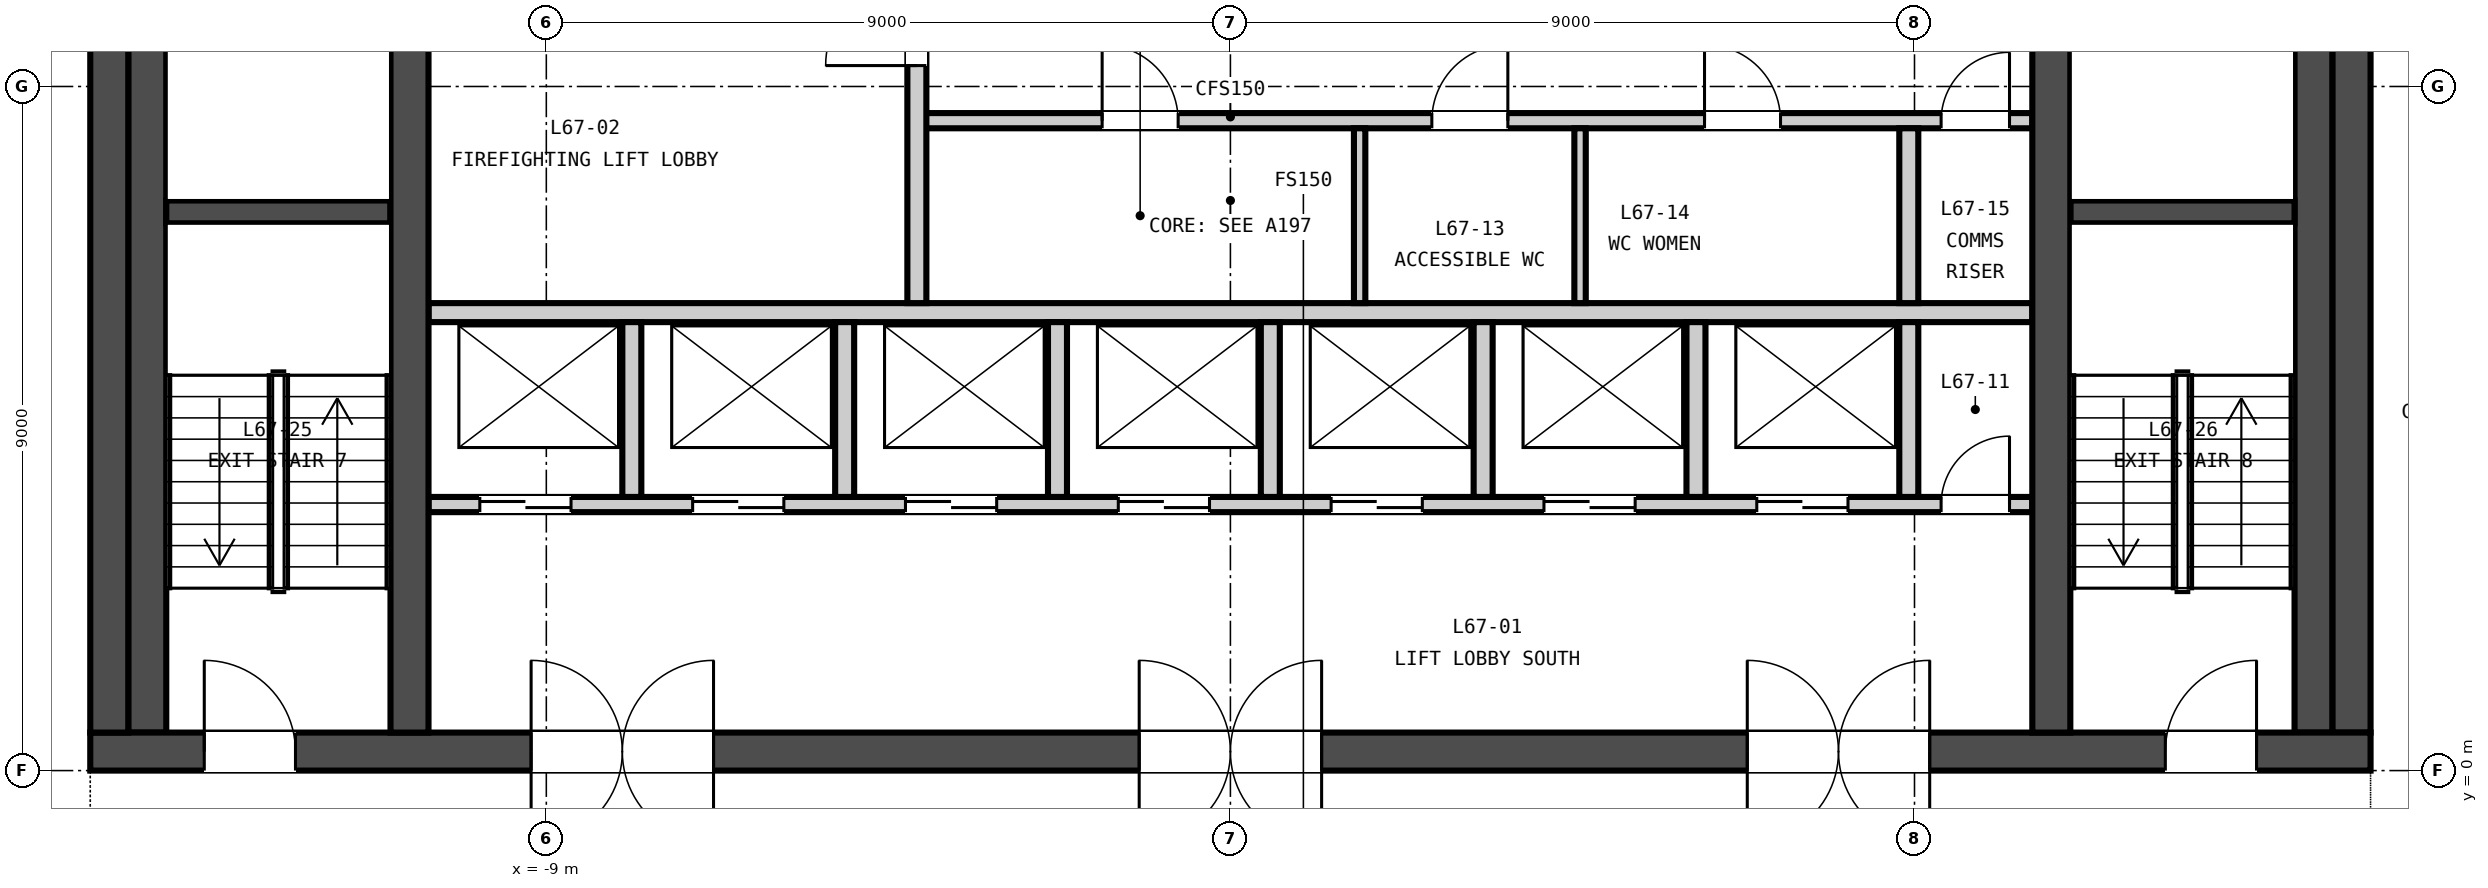
"""IFC4 building model, lengths in metres.
Left out: names, types, materials, properties, quantities, classifications, styles, units other than length and angle.
Written with IfcOpenShell. Run it as: python <this file> out.ifc"""

import sys

from ifc_helpers import new_model, si_unit, direction, frame, frame_2d, origin, place, context, subcontext, project, spatial, rectangle, extrude, element, fill, save


model = new_model("IFC4")
c1 = context("Model", 3, precision=1e-05, world=origin(), true_north=direction((0.0, 1.0)))
c2 = subcontext(c1, "Body", "Model", "MODEL_VIEW")
j1 = project(units=[si_unit("LENGTHUNIT", "METRE"), si_unit("PLANEANGLEUNIT", "RADIAN")], contexts=[c1])
p1 = place(None, origin())
s1 = spatial("IfcSite", under=j1, at=p1, CompositionType="ELEMENT")
p2 = place(p1, origin())
s2 = spatial("IfcBuilding", under=s1, at=p2, CompositionType="ELEMENT")
p3 = place(p2, frame((0.0, 0.0, 264.6)))
s3 = spatial("IfcBuildingStorey", under=s2, at=p3, CompositionType="ELEMENT", Elevation=264.6)
p4 = place(p3, frame((-15.0, 0.25, -0.15), z_axis=(0.0, 0.0, 1.0), x_axis=(1.0, 0.0, 0.0)))
e1 = element("IfcWall", 1, at=p4, inside=s3, PredefinedType="SOLIDWALL", context=c2, shape_type="SweptSolid", body=[
    extrude(rectangle(XDim=30.0, YDim=0.5, at=frame_2d((15.0, 0.0))), origin(), (0.0, 0.0, 1.0), 3.65),
])
p5 = place(p4, frame((5.8, 0.0, 0.15)))
e2 = element("IfcOpeningElement", 2, at=p5, cuts=e1, PredefinedType="OPENING", context=c2, shape_type="SweptSolid", body=[
    extrude(rectangle(XDim=2.4, YDim=2.4, at=frame_2d((1.2, 1.2))), frame((0.0, 0.26, 0.0), z_axis=(0.0, -1.0, 0.0), x_axis=(1.0, 0.0, 0.0)), (0.0, 0.0, 1.0), 0.52),
])
p6 = place(p4, frame((13.8, 0.0, 0.15)))
e3 = element("IfcOpeningElement", 3, at=p6, cuts=e1, PredefinedType="OPENING", context=c2, shape_type="SweptSolid", body=[
    extrude(rectangle(XDim=2.4, YDim=2.4, at=frame_2d((1.2, 1.2))), frame((0.0, 0.26, 0.0), z_axis=(0.0, -1.0, 0.0), x_axis=(1.0, 0.0, 0.0)), (0.0, 0.0, 1.0), 0.52),
])
p7 = place(p4, frame((21.8, 0.0, 0.15)))
e4 = element("IfcOpeningElement", 4, at=p7, cuts=e1, PredefinedType="OPENING", context=c2, shape_type="SweptSolid", body=[
    extrude(rectangle(XDim=2.4, YDim=2.4, at=frame_2d((1.2, 1.2))), frame((0.0, 0.26, 0.0), z_axis=(0.0, -1.0, 0.0), x_axis=(1.0, 0.0, 0.0)), (0.0, 0.0, 1.0), 0.52),
])
p8 = place(p4, frame((1.5, 0.0, 0.15)))
e5 = element("IfcOpeningElement", 5, at=p8, cuts=e1, PredefinedType="OPENING", context=c2, shape_type="SweptSolid", body=[
    extrude(rectangle(XDim=1.2, YDim=2.1, at=frame_2d((0.6, 1.05))), frame((0.0, 0.26, 0.0), z_axis=(0.0, -1.0, 0.0), x_axis=(1.0, 0.0, 0.0)), (0.0, 0.0, 1.0), 0.52),
])
p9 = place(p4, frame((27.3, 0.0, 0.15)))
e6 = element("IfcOpeningElement", 6, at=p9, cuts=e1, PredefinedType="OPENING", context=c2, shape_type="SweptSolid", body=[
    extrude(rectangle(XDim=1.2, YDim=2.1, at=frame_2d((0.6, 1.05))), frame((0.0, 0.26, 0.0), z_axis=(0.0, -1.0, 0.0), x_axis=(1.0, 0.0, 0.0)), (0.0, 0.0, 1.0), 0.52),
])
for number, where, z_axis, x_axis in (
    (7, (-14.75, 0.5, -0.15), (0.0, 0.0, 1.0), (0.0, 1.0, 0.0)),
    (8, (14.75, 0.5, -0.15), (0.0, 0.0, 1.0), (0.0, 1.0, 0.0)),
    (9, (-10.8, 0.5, -0.15), (0.0, 0.0, 1.0), (0.0, 1.0, 0.0)),
    (10, (10.8, 0.5, -0.15), (0.0, 0.0, 1.0), (0.0, 1.0, 0.0)),
):
    element("IfcWall", number, at=place(p3, frame(where, z_axis=z_axis, x_axis=x_axis)), inside=s3, PredefinedType="SOLIDWALL", context=c2, shape_type="SweptSolid", body=[
        extrude(rectangle(XDim=14.0, YDim=0.5, at=frame_2d((7.0, 0.0))), origin(), (0.0, 0.0, 1.0), 3.65),
    ])
p10 = place(p3, frame((-10.55, 3.5, 0.0), z_axis=(0.0, 0.0, 1.0), x_axis=(1.0, 0.0, 0.0)))
e11 = element("IfcWall", 11, at=p10, inside=s3, PredefinedType="PARTITIONING", context=c2, shape_type="SweptSolid", body=[
    extrude(rectangle(XDim=21.1, YDim=0.2, at=frame_2d((10.55, 0.0))), origin(), (0.0, 0.0, 1.0), 3.5),
])
p11 = place(p10, frame((0.675, 0.0, 0.0)))
e12 = element("IfcOpeningElement", 12, at=p11, cuts=e11, PredefinedType="OPENING", context=c2, shape_type="SweptSolid", body=[
    extrude(rectangle(XDim=1.2, YDim=2.1, at=frame_2d((0.6, 1.05))), frame((0.0, 0.11, 0.0), z_axis=(0.0, -1.0, 0.0), x_axis=(1.0, 0.0, 0.0)), (0.0, 0.0, 1.0), 0.22),
])
p12 = place(p10, frame((3.475, 0.0, 0.0)))
e13 = element("IfcOpeningElement", 13, at=p12, cuts=e11, PredefinedType="OPENING", context=c2, shape_type="SweptSolid", body=[
    extrude(rectangle(XDim=1.2, YDim=2.1, at=frame_2d((0.6, 1.05))), frame((0.0, 0.11, 0.0), z_axis=(0.0, -1.0, 0.0), x_axis=(1.0, 0.0, 0.0)), (0.0, 0.0, 1.0), 0.22),
])
p13 = place(p10, frame((6.275, 0.0, 0.0)))
e14 = element("IfcOpeningElement", 14, at=p13, cuts=e11, PredefinedType="OPENING", context=c2, shape_type="SweptSolid", body=[
    extrude(rectangle(XDim=1.2, YDim=2.1, at=frame_2d((0.6, 1.05))), frame((0.0, 0.11, 0.0), z_axis=(0.0, -1.0, 0.0), x_axis=(1.0, 0.0, 0.0)), (0.0, 0.0, 1.0), 0.22),
])
p14 = place(p10, frame((9.075, 0.0, 0.0)))
e15 = element("IfcOpeningElement", 15, at=p14, cuts=e11, PredefinedType="OPENING", context=c2, shape_type="SweptSolid", body=[
    extrude(rectangle(XDim=1.2, YDim=2.1, at=frame_2d((0.6, 1.05))), frame((0.0, 0.11, 0.0), z_axis=(0.0, -1.0, 0.0), x_axis=(1.0, 0.0, 0.0)), (0.0, 0.0, 1.0), 0.22),
])
p15 = place(p10, frame((11.875, 0.0, 0.0)))
e16 = element("IfcOpeningElement", 16, at=p15, cuts=e11, PredefinedType="OPENING", context=c2, shape_type="SweptSolid", body=[
    extrude(rectangle(XDim=1.2, YDim=2.1, at=frame_2d((0.6, 1.05))), frame((0.0, 0.11, 0.0), z_axis=(0.0, -1.0, 0.0), x_axis=(1.0, 0.0, 0.0)), (0.0, 0.0, 1.0), 0.22),
])
p16 = place(p10, frame((14.675, 0.0, 0.0)))
e17 = element("IfcOpeningElement", 17, at=p16, cuts=e11, PredefinedType="OPENING", context=c2, shape_type="SweptSolid", body=[
    extrude(rectangle(XDim=1.2, YDim=2.1, at=frame_2d((0.6, 1.05))), frame((0.0, 0.11, 0.0), z_axis=(0.0, -1.0, 0.0), x_axis=(1.0, 0.0, 0.0)), (0.0, 0.0, 1.0), 0.22),
])
p17 = place(p10, frame((17.475, 0.0, 0.0)))
e18 = element("IfcOpeningElement", 18, at=p17, cuts=e11, PredefinedType="OPENING", context=c2, shape_type="SweptSolid", body=[
    extrude(rectangle(XDim=1.2, YDim=2.1, at=frame_2d((0.6, 1.05))), frame((0.0, 0.11, 0.0), z_axis=(0.0, -1.0, 0.0), x_axis=(1.0, 0.0, 0.0)), (0.0, 0.0, 1.0), 0.22),
])
p18 = place(p10, frame((19.9, 0.0, 0.0)))
e19 = element("IfcOpeningElement", 19, at=p18, cuts=e11, PredefinedType="OPENING", context=c2, shape_type="SweptSolid", body=[
    extrude(rectangle(XDim=0.9, YDim=2.1, at=frame_2d((0.45, 1.05))), frame((0.0, 0.11, 0.0), z_axis=(0.0, -1.0, 0.0), x_axis=(1.0, 0.0, 0.0)), (0.0, 0.0, 1.0), 0.22),
])
p19 = place(p3, frame((-10.55, 6.025, 0.0), z_axis=(0.0, 0.0, 1.0), x_axis=(1.0, 0.0, 0.0)))
e20 = element("IfcWall", 20, at=p19, inside=s3, PredefinedType="PARTITIONING", context=c2, shape_type="SweptSolid", body=[
    extrude(rectangle(XDim=21.1, YDim=0.25, at=frame_2d((10.55, 0.0))), origin(), (0.0, 0.0, 1.0), 3.5),
])
p20 = place(p3, frame((-4.125, 8.55, 0.0), z_axis=(0.0, 0.0, 1.0), x_axis=(1.0, 0.0, 0.0)))
e21 = element("IfcWall", 21, at=p20, inside=s3, PredefinedType="PARTITIONING", context=c2, shape_type="SweptSolid", body=[
    extrude(rectangle(XDim=14.675, YDim=0.2, at=frame_2d((7.337, 0.0))), origin(), (0.0, 0.0, 1.0), 3.5),
])
p21 = place(p20, frame((2.438, 0.0, 0.0)))
e22 = element("IfcOpeningElement", 22, at=p21, cuts=e21, PredefinedType="OPENING", context=c2, shape_type="SweptSolid", body=[
    extrude(rectangle(XDim=1.0, YDim=2.1, at=frame_2d((0.5, 1.05))), frame((0.0, 0.11, 0.0), z_axis=(0.0, -1.0, 0.0), x_axis=(1.0, 0.0, 0.0)), (0.0, 0.0, 1.0), 0.22),
])
p22 = place(p20, frame((6.775, 0.0, 0.0)))
e23 = element("IfcOpeningElement", 23, at=p22, cuts=e21, PredefinedType="OPENING", context=c2, shape_type="SweptSolid", body=[
    extrude(rectangle(XDim=1.0, YDim=2.1, at=frame_2d((0.5, 1.05))), frame((0.0, 0.11, 0.0), z_axis=(0.0, -1.0, 0.0), x_axis=(1.0, 0.0, 0.0)), (0.0, 0.0, 1.0), 0.22),
])
p23 = place(p20, frame((10.363, 0.0, 0.0)))
e24 = element("IfcOpeningElement", 24, at=p23, cuts=e21, PredefinedType="OPENING", context=c2, shape_type="SweptSolid", body=[
    extrude(rectangle(XDim=1.0, YDim=2.1, at=frame_2d((0.5, 1.05))), frame((0.0, 0.11, 0.0), z_axis=(0.0, -1.0, 0.0), x_axis=(1.0, 0.0, 0.0)), (0.0, 0.0, 1.0), 0.22),
])
p24 = place(p20, frame((13.475, 0.0, 0.0)))
e25 = element("IfcOpeningElement", 25, at=p24, cuts=e21, PredefinedType="OPENING", context=c2, shape_type="SweptSolid", body=[
    extrude(rectangle(XDim=0.9, YDim=2.1, at=frame_2d((0.45, 1.05))), frame((0.0, 0.11, 0.0), z_axis=(0.0, -1.0, 0.0), x_axis=(1.0, 0.0, 0.0)), (0.0, 0.0, 1.0), 0.22),
])
p25 = place(p3, frame((-4.125, 6.15, 0.0), z_axis=(0.0, 0.0, 1.0), x_axis=(0.0, 1.0, 0.0)))
e26 = element("IfcWall", 26, at=p25, inside=s3, PredefinedType="PARTITIONING", context=c2, shape_type="SweptSolid", body=[
    extrude(rectangle(XDim=4.95, YDim=0.25, at=frame_2d((2.475, 0.0))), origin(), (0.0, 0.0, 1.0), 3.5),
])
p26 = place(p25, frame((3.125, 0.0, 0.0)))
e27 = element("IfcOpeningElement", 27, at=p26, cuts=e26, PredefinedType="OPENING", context=c2, shape_type="SweptSolid", body=[
    extrude(rectangle(XDim=1.2, YDim=2.1, at=frame_2d((0.6, 1.05))), frame((0.0, 0.135, 0.0), z_axis=(0.0, -1.0, 0.0), x_axis=(1.0, 0.0, 0.0)), (0.0, 0.0, 1.0), 0.27),
])
for number, where, z_axis, x_axis in (
    (28, (-7.875, 3.6, 0.0), (0.0, 0.0, 1.0), (0.0, 1.0, 0.0)),
    (29, (-5.075, 3.6, 0.0), (0.0, 0.0, 1.0), (0.0, 1.0, 0.0)),
    (30, (-2.275, 3.6, 0.0), (0.0, 0.0, 1.0), (0.0, 1.0, 0.0)),
    (31, (0.525, 3.6, 0.0), (0.0, 0.0, 1.0), (0.0, 1.0, 0.0)),
    (32, (3.325, 3.6, 0.0), (0.0, 0.0, 1.0), (0.0, 1.0, 0.0)),
    (33, (6.125, 3.6, 0.0), (0.0, 0.0, 1.0), (0.0, 1.0, 0.0)),
    (34, (8.925, 3.6, 0.0), (0.0, 0.0, 1.0), (0.0, 1.0, 0.0)),
):
    element("IfcWall", number, at=place(p3, frame(where, z_axis=z_axis, x_axis=x_axis)), inside=s3, PredefinedType="PARTITIONING", context=c2, shape_type="SweptSolid", body=[
        extrude(rectangle(XDim=2.3, YDim=0.25, at=frame_2d((1.15, 0.0))), origin(), (0.0, 0.0, 1.0), 3.5),
    ])
for number, where, z_axis, x_axis in (
    (35, (1.7, 6.15, 0.0), (0.0, 0.0, 1.0), (0.0, 1.0, 0.0)),
    (36, (4.6, 6.15, 0.0), (0.0, 0.0, 1.0), (0.0, 1.0, 0.0)),
):
    element("IfcWall", number, at=place(p3, frame(where, z_axis=z_axis, x_axis=x_axis)), inside=s3, PredefinedType="PARTITIONING", context=c2, shape_type="SweptSolid", body=[
        extrude(rectangle(XDim=2.3, YDim=0.15, at=frame_2d((1.15, 0.0))), origin(), (0.0, 0.0, 1.0), 3.5),
    ])
p27 = place(p3, frame((8.925, 6.15, 0.0), z_axis=(0.0, 0.0, 1.0), x_axis=(0.0, 1.0, 0.0)))
e37 = element("IfcWall", 37, at=p27, inside=s3, PredefinedType="PARTITIONING", context=c2, shape_type="SweptSolid", body=[
    extrude(rectangle(XDim=2.3, YDim=0.25, at=frame_2d((1.15, 0.0))), origin(), (0.0, 0.0, 1.0), 3.5),
])
p28 = place(p3, frame((-14.0, 7.35, 0.0), z_axis=(0.0, 0.0, 1.0), x_axis=(1.0, 0.0, 0.0)))
e38 = element("IfcWall", 38, at=p28, inside=s3, PredefinedType="SOLIDWALL", context=c2, shape_type="SweptSolid", body=[
    extrude(rectangle(XDim=2.95, YDim=0.3, at=frame_2d((1.475, 0.0))), origin(), (0.0, 0.0, 1.0), 3.5),
])
p29 = place(p3, frame((-14.25, 0.5, 0.0), z_axis=(0.0, 0.0, 1.0), x_axis=(0.0, 1.0, 0.0)))
e39 = element("IfcWall", 39, at=p29, inside=s3, PredefinedType="SOLIDWALL", context=c2, shape_type="SweptSolid", body=[
    extrude(rectangle(XDim=14.0, YDim=0.5, at=frame_2d((7.0, 0.0))), origin(), (0.0, 0.0, 1.0), 3.5),
])
p30 = place(p3, frame((11.05, 7.35, 0.0), z_axis=(0.0, 0.0, 1.0), x_axis=(1.0, 0.0, 0.0)))
e40 = element("IfcWall", 40, at=p30, inside=s3, PredefinedType="SOLIDWALL", context=c2, shape_type="SweptSolid", body=[
    extrude(rectangle(XDim=2.95, YDim=0.3, at=frame_2d((1.475, 0.0))), origin(), (0.0, 0.0, 1.0), 3.5),
])
p31 = place(p3, frame((14.25, 0.5, 0.0), z_axis=(0.0, 0.0, 1.0), x_axis=(0.0, 1.0, 0.0)))
e41 = element("IfcWall", 41, at=p31, inside=s3, PredefinedType="SOLIDWALL", context=c2, shape_type="SweptSolid", body=[
    extrude(rectangle(XDim=14.0, YDim=0.5, at=frame_2d((7.0, 0.0))), origin(), (0.0, 0.0, 1.0), 3.5),
])
p32 = place(p26, origin())
e42 = element("IfcDoor", 42, at=p32, inside=s3, OperationType="SINGLE_SWING_LEFT", PredefinedType="DOOR", context=c2, shape_type="SweptSolid", body=[
    extrude(rectangle(XDim=1.2, YDim=2.1, at=frame_2d((0.6, 1.05))), frame((0.0, 0.025, 0.0), z_axis=(0.0, -1.0, 0.0), x_axis=(1.0, 0.0, 0.0)), (0.0, 0.0, 1.0), 0.05),
])
fill(e27, e42)
p33 = place(p11, origin())
e43 = element("IfcDoor", 43, at=p33, inside=s3, OperationType="DOUBLE_DOOR_SLIDING", PredefinedType="DOOR", context=c2, shape_type="SweptSolid", body=[
    extrude(rectangle(XDim=1.2, YDim=2.1, at=frame_2d((0.6, 1.05))), frame((0.0, 0.025, 0.0), z_axis=(0.0, -1.0, 0.0), x_axis=(1.0, 0.0, 0.0)), (0.0, 0.0, 1.0), 0.05),
])
fill(e12, e43)
p34 = place(p12, origin())
e44 = element("IfcDoor", 44, at=p34, inside=s3, OperationType="DOUBLE_DOOR_SLIDING", PredefinedType="DOOR", context=c2, shape_type="SweptSolid", body=[
    extrude(rectangle(XDim=1.2, YDim=2.1, at=frame_2d((0.6, 1.05))), frame((0.0, 0.025, 0.0), z_axis=(0.0, -1.0, 0.0), x_axis=(1.0, 0.0, 0.0)), (0.0, 0.0, 1.0), 0.05),
])
fill(e13, e44)
p35 = place(p13, origin())
e45 = element("IfcDoor", 45, at=p35, inside=s3, OperationType="DOUBLE_DOOR_SLIDING", PredefinedType="DOOR", context=c2, shape_type="SweptSolid", body=[
    extrude(rectangle(XDim=1.2, YDim=2.1, at=frame_2d((0.6, 1.05))), frame((0.0, 0.025, 0.0), z_axis=(0.0, -1.0, 0.0), x_axis=(1.0, 0.0, 0.0)), (0.0, 0.0, 1.0), 0.05),
])
fill(e14, e45)
p36 = place(p14, origin())
e46 = element("IfcDoor", 46, at=p36, inside=s3, OperationType="DOUBLE_DOOR_SLIDING", PredefinedType="DOOR", context=c2, shape_type="SweptSolid", body=[
    extrude(rectangle(XDim=1.2, YDim=2.1, at=frame_2d((0.6, 1.05))), frame((0.0, 0.025, 0.0), z_axis=(0.0, -1.0, 0.0), x_axis=(1.0, 0.0, 0.0)), (0.0, 0.0, 1.0), 0.05),
])
fill(e15, e46)
p37 = place(p15, origin())
e47 = element("IfcDoor", 47, at=p37, inside=s3, OperationType="DOUBLE_DOOR_SLIDING", PredefinedType="DOOR", context=c2, shape_type="SweptSolid", body=[
    extrude(rectangle(XDim=1.2, YDim=2.1, at=frame_2d((0.6, 1.05))), frame((0.0, 0.025, 0.0), z_axis=(0.0, -1.0, 0.0), x_axis=(1.0, 0.0, 0.0)), (0.0, 0.0, 1.0), 0.05),
])
fill(e16, e47)
p38 = place(p16, origin())
e48 = element("IfcDoor", 48, at=p38, inside=s3, OperationType="DOUBLE_DOOR_SLIDING", PredefinedType="DOOR", context=c2, shape_type="SweptSolid", body=[
    extrude(rectangle(XDim=1.2, YDim=2.1, at=frame_2d((0.6, 1.05))), frame((0.0, 0.025, 0.0), z_axis=(0.0, -1.0, 0.0), x_axis=(1.0, 0.0, 0.0)), (0.0, 0.0, 1.0), 0.05),
])
fill(e17, e48)
p39 = place(p17, origin())
e49 = element("IfcDoor", 49, at=p39, inside=s3, OperationType="DOUBLE_DOOR_SLIDING", PredefinedType="DOOR", context=c2, shape_type="SweptSolid", body=[
    extrude(rectangle(XDim=1.2, YDim=2.1, at=frame_2d((0.6, 1.05))), frame((0.0, 0.025, 0.0), z_axis=(0.0, -1.0, 0.0), x_axis=(1.0, 0.0, 0.0)), (0.0, 0.0, 1.0), 0.05),
])
fill(e18, e49)
p40 = place(p18, origin())
e50 = element("IfcDoor", 50, at=p40, inside=s3, OperationType="SINGLE_SWING_RIGHT", PredefinedType="DOOR", context=c2, shape_type="SweptSolid", body=[
    extrude(rectangle(XDim=0.9, YDim=2.1, at=frame_2d((0.45, 1.05))), frame((0.0, 0.025, 0.0), z_axis=(0.0, -1.0, 0.0), x_axis=(1.0, 0.0, 0.0)), (0.0, 0.0, 1.0), 0.05),
])
fill(e19, e50)
p41 = place(p21, origin())
e51 = element("IfcDoor", 51, at=p41, inside=s3, OperationType="SINGLE_SWING_LEFT", PredefinedType="DOOR", context=c2, shape_type="SweptSolid", body=[
    extrude(rectangle(XDim=1.0, YDim=2.1, at=frame_2d((0.5, 1.05))), frame((0.0, 0.025, 0.0), z_axis=(0.0, -1.0, 0.0), x_axis=(1.0, 0.0, 0.0)), (0.0, 0.0, 1.0), 0.05),
])
fill(e22, e51)
p42 = place(p22, origin())
e52 = element("IfcDoor", 52, at=p42, inside=s3, OperationType="SINGLE_SWING_RIGHT", PredefinedType="DOOR", context=c2, shape_type="SweptSolid", body=[
    extrude(rectangle(XDim=1.0, YDim=2.1, at=frame_2d((0.5, 1.05))), frame((0.0, 0.025, 0.0), z_axis=(0.0, -1.0, 0.0), x_axis=(1.0, 0.0, 0.0)), (0.0, 0.0, 1.0), 0.05),
])
fill(e23, e52)
p43 = place(p23, origin())
e53 = element("IfcDoor", 53, at=p43, inside=s3, OperationType="SINGLE_SWING_LEFT", PredefinedType="DOOR", context=c2, shape_type="SweptSolid", body=[
    extrude(rectangle(XDim=1.0, YDim=2.1, at=frame_2d((0.5, 1.05))), frame((0.0, 0.025, 0.0), z_axis=(0.0, -1.0, 0.0), x_axis=(1.0, 0.0, 0.0)), (0.0, 0.0, 1.0), 0.05),
])
fill(e24, e53)
p44 = place(p24, origin())
e54 = element("IfcDoor", 54, at=p44, inside=s3, OperationType="SINGLE_SWING_RIGHT", PredefinedType="DOOR", context=c2, shape_type="SweptSolid", body=[
    extrude(rectangle(XDim=0.9, YDim=2.1, at=frame_2d((0.45, 1.05))), frame((0.0, 0.025, 0.0), z_axis=(0.0, -1.0, 0.0), x_axis=(1.0, 0.0, 0.0)), (0.0, 0.0, 1.0), 0.05),
])
fill(e25, e54)
p45 = place(p5, origin())
e55 = element("IfcDoor", 55, at=p45, inside=s3, OperationType="DOUBLE_DOOR_DOUBLE_SWING", PredefinedType="DOOR", context=c2, shape_type="SweptSolid", body=[
    extrude(rectangle(XDim=2.4, YDim=2.4, at=frame_2d((1.2, 1.2))), frame((0.0, 0.025, 0.0), z_axis=(0.0, -1.0, 0.0), x_axis=(1.0, 0.0, 0.0)), (0.0, 0.0, 1.0), 0.05),
])
fill(e2, e55)
p46 = place(p6, origin())
e56 = element("IfcDoor", 56, at=p46, inside=s3, OperationType="DOUBLE_DOOR_DOUBLE_SWING", PredefinedType="DOOR", context=c2, shape_type="SweptSolid", body=[
    extrude(rectangle(XDim=2.4, YDim=2.4, at=frame_2d((1.2, 1.2))), frame((0.0, 0.025, 0.0), z_axis=(0.0, -1.0, 0.0), x_axis=(1.0, 0.0, 0.0)), (0.0, 0.0, 1.0), 0.05),
])
fill(e3, e56)
p47 = place(p7, origin())
e57 = element("IfcDoor", 57, at=p47, inside=s3, OperationType="DOUBLE_DOOR_DOUBLE_SWING", PredefinedType="DOOR", context=c2, shape_type="SweptSolid", body=[
    extrude(rectangle(XDim=2.4, YDim=2.4, at=frame_2d((1.2, 1.2))), frame((0.0, 0.025, 0.0), z_axis=(0.0, -1.0, 0.0), x_axis=(1.0, 0.0, 0.0)), (0.0, 0.0, 1.0), 0.05),
])
fill(e4, e57)
p48 = place(p8, origin())
e58 = element("IfcDoor", 58, at=p48, inside=s3, OperationType="SINGLE_SWING_LEFT", PredefinedType="DOOR", context=c2, shape_type="SweptSolid", body=[
    extrude(rectangle(XDim=1.2, YDim=2.1, at=frame_2d((0.6, 1.05))), frame((0.0, 0.025, 0.0), z_axis=(0.0, -1.0, 0.0), x_axis=(1.0, 0.0, 0.0)), (0.0, 0.0, 1.0), 0.05),
])
fill(e5, e58)
p49 = place(p9, origin())
e59 = element("IfcDoor", 59, at=p49, inside=s3, OperationType="SINGLE_SWING_RIGHT", PredefinedType="DOOR", context=c2, shape_type="SweptSolid", body=[
    extrude(rectangle(XDim=1.2, YDim=2.1, at=frame_2d((0.6, 1.05))), frame((0.0, 0.025, 0.0), z_axis=(0.0, -1.0, 0.0), x_axis=(1.0, 0.0, 0.0)), (0.0, 0.0, 1.0), 0.05),
])
fill(e6, e59)
save(model, sys.argv[1])
